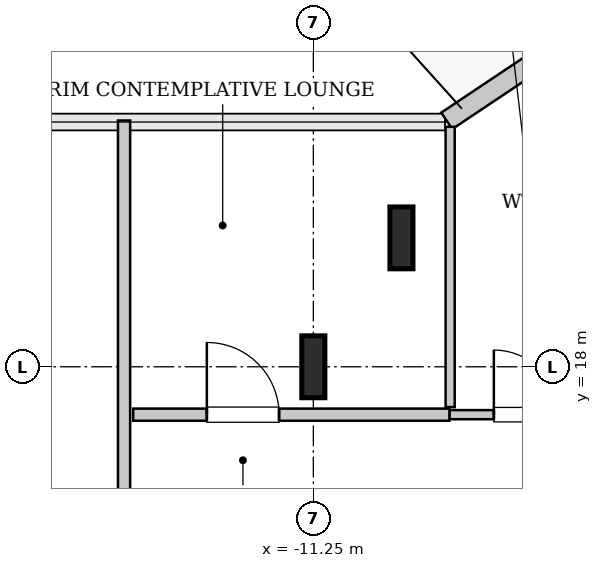
"""IFC4 building model, lengths in metres.
Left out: names, types, materials, properties, quantities, classifications, styles, units other than length and angle.
Written with IfcOpenShell. Run it as: python <this file> out.ifc"""

import sys

from ifc_helpers import new_model, si_unit, direction, frame, frame_2d, origin, origin_2d, place, context, subcontext, project, spatial, rectangle, i_section, extrude, source, transform, mapped, element, fill, save


model = new_model("IFC4")
c1 = context("Model", 3, precision=1e-05, world=origin(), true_north=direction((0.0, 1.0)))
c2 = subcontext(c1, "Body", "Model", "MODEL_VIEW")
j1 = project(units=[si_unit("LENGTHUNIT", "METRE"), si_unit("PLANEANGLEUNIT", "RADIAN")], contexts=[c1])
p1 = place(None, origin())
s1 = spatial("IfcSite", under=j1, at=p1, CompositionType="ELEMENT")
p2 = place(p1, origin())
s2 = spatial("IfcBuilding", under=s1, at=p2, CompositionType="ELEMENT")
p3 = place(p2, frame((0.0, 0.0, 171.6)))
s3 = spatial("IfcBuildingStorey", under=s2, at=p3, CompositionType="ELEMENT", Elevation=171.6)
m1 = source(origin(), c2, "Body", "SweptSolid", [
    extrude(i_section(OverallWidth=0.303, OverallDepth=0.814, WebThickness=0.021, FlangeThickness=0.04, FilletRadius=0.03, at=origin_2d()), origin(), (0.0, 0.0, 1.0), 3.8),
])
for number, where, z_axis, x_axis in (
    (1, (-11.25, 18.0, 0.0), (0.0, 0.0, 1.0), (1.0, 0.0, 0.0)),
    (2, (-10.091, 19.696, 0.0), (0.0, 0.0, 1.0), (1.0, 0.0, 0.0)),
):
    element("IfcColumn", number, at=place(p3, frame(where, z_axis=z_axis, x_axis=x_axis)), inside=s3, PredefinedType="COLUMN", context=c2, shape_type="MappedRepresentation", body=[
        mapped(m1, transform((0.0, 0.0, 0.0), x_axis=(1.0, 0.0, 0.0), y_axis=(0.0, 1.0, 0.0), z_axis=(0.0, 0.0, 1.0), scale=1.0)),
    ])
m2 = source(origin(), c2, "Body", "SweptSolid", [
    extrude(rectangle(XDim=1.469, YDim=0.26, at=frame_2d((0.734, 0.0))), origin(), (0.0, 0.0, 1.0), 3.55),
])
p4 = place(p3, frame((-8.273, 22.052, 0.0), z_axis=(0.0, 0.0, 1.0), x_axis=(-0.831461760506, -0.555581983884, 0.0)))
e3 = element("IfcWall", 3, at=p4, inside=s3, PredefinedType="SOLIDWALL", context=c2, shape_type="MappedRepresentation", body=[
    mapped(m2, transform((0.0, 0.0, 0.0), x_axis=(1.0, 0.0, 0.0), y_axis=(0.0, 1.0, 0.0), z_axis=(0.0, 0.0, 1.0), scale=1.0)),
])
m3 = source(origin(), c2, "Body", "SweptSolid", [
    extrude(rectangle(XDim=2.02, YDim=0.12, at=frame_2d((1.01, 0.0))), origin(), (0.0, 0.0, 1.0), 3.535),
])
p5 = place(p3, frame((-9.46, 17.37, 0.0), z_axis=(0.0, 0.0, 1.0), x_axis=(1.0, 0.0, 0.0)))
e4 = element("IfcWall", 4, at=p5, inside=s3, PredefinedType="PLUMBINGWALL", context=c2, shape_type="MappedRepresentation", body=[
    mapped(m3, transform((0.0, 0.0, 0.0), x_axis=(1.0, 0.0, 0.0), y_axis=(0.0, 1.0, 0.0), z_axis=(0.0, 0.0, 1.0), scale=1.0)),
])
p6 = place(p5, frame((0.585, 0.0, 0.0)))
e5 = element("IfcOpeningElement", 5, at=p6, cuts=e4, PredefinedType="OPENING", context=c2, shape_type="SweptSolid", body=[
    extrude(rectangle(XDim=0.85, YDim=2.1, at=frame_2d((0.425, 1.05))), frame((0.0, 0.07, 0.0), z_axis=(0.0, -1.0, 0.0), x_axis=(1.0, 0.0, 0.0)), (0.0, 0.0, 1.0), 0.14),
])
m4 = source(origin(), c2, "Body", "SweptSolid", [
    extrude(rectangle(XDim=3.687, YDim=0.12, at=frame_2d((1.843, 0.0))), origin(), (0.0, 0.0, 1.0), 3.535),
])
p7 = place(p3, frame((-9.45, 17.47, 0.0), z_axis=(0.0, 0.0, 1.0), x_axis=(0.0, 1.0, 0.0)))
e6 = element("IfcWall", 6, at=p7, inside=s3, PredefinedType="PLUMBINGWALL", context=c2, shape_type="MappedRepresentation", body=[
    mapped(m4, transform((0.0, 0.0, 0.0), x_axis=(1.0, 0.0, 0.0), y_axis=(0.0, 1.0, 0.0), z_axis=(0.0, 0.0, 1.0), scale=1.0)),
])
m5 = source(origin(), c2, "Body", "SweptSolid", [
    extrude(rectangle(XDim=12.752, YDim=0.16, at=frame_2d((6.376, 0.0))), origin(), (0.0, 0.0, 1.0), 3.535),
])
p8 = place(p3, frame((-13.74, 8.488, 0.0), z_axis=(0.0, 0.0, 1.0), x_axis=(0.0, 1.0, 0.0)))
e7 = element("IfcWall", 7, at=p8, inside=s3, PredefinedType="PARTITIONING", context=c2, shape_type="MappedRepresentation", body=[
    mapped(m5, transform((0.0, 0.0, 0.0), x_axis=(1.0, 0.0, 0.0), y_axis=(0.0, 1.0, 0.0), z_axis=(0.0, 0.0, 1.0), scale=1.0)),
])
p9 = place(p8, frame((3.986, 0.0, 0.0)))
e8 = element("IfcOpeningElement", 8, at=p9, cuts=e7, PredefinedType="OPENING", context=c2, shape_type="SweptSolid", body=[
    extrude(rectangle(XDim=0.95, YDim=2.1, at=frame_2d((0.475, 1.05))), frame((0.0, 0.09, 0.0), z_axis=(0.0, -1.0, 0.0), x_axis=(1.0, 0.0, 0.0)), (0.0, 0.0, 1.0), 0.18),
])
m6 = source(origin(), c2, "Body", "SweptSolid", [
    extrude(rectangle(XDim=4.16, YDim=0.16, at=frame_2d((2.08, 0.0))), origin(), (0.0, 0.0, 1.0), 3.535),
])
p10 = place(p3, frame((-13.62, 17.37, 0.0), z_axis=(0.0, 0.0, 1.0), x_axis=(1.0, 0.0, 0.0)))
e9 = element("IfcWall", 9, at=p10, inside=s3, PredefinedType="PARTITIONING", context=c2, shape_type="MappedRepresentation", body=[
    mapped(m6, transform((0.0, 0.0, 0.0), x_axis=(1.0, 0.0, 0.0), y_axis=(0.0, 1.0, 0.0), z_axis=(0.0, 0.0, 1.0), scale=1.0)),
])
p11 = place(p10, frame((0.969, 0.0, 0.0)))
e10 = element("IfcOpeningElement", 10, at=p11, cuts=e9, PredefinedType="OPENING", context=c2, shape_type="SweptSolid", body=[
    extrude(rectangle(XDim=0.95, YDim=2.1, at=frame_2d((0.475, 1.05))), frame((0.0, 0.09, 0.0), z_axis=(0.0, -1.0, 0.0), x_axis=(1.0, 0.0, 0.0)), (0.0, 0.0, 1.0), 0.18),
])
m7 = source(origin(), c2, "Body", "SweptSolid", [
    extrude(rectangle(XDim=0.85, YDim=2.1, at=frame_2d((0.425, 1.05))), frame((0.0, 0.025, 0.0), z_axis=(0.0, -1.0, 0.0), x_axis=(1.0, 0.0, 0.0)), (0.0, 0.0, 1.0), 0.05),
])
p12 = place(p6, origin())
e11 = element("IfcDoor", 11, at=p12, inside=s3, OperationType="SINGLE_SWING_LEFT", PredefinedType="DOOR", context=c2, shape_type="MappedRepresentation", body=[
    mapped(m7, transform((0.0, 0.0, 0.0), x_axis=(1.0, 0.0, 0.0), y_axis=(0.0, 1.0, 0.0), z_axis=(0.0, 0.0, 1.0), scale=1.0)),
])
fill(e5, e11)
m8 = source(origin(), c2, "Body", "SweptSolid", [
    extrude(rectangle(XDim=0.95, YDim=2.1, at=frame_2d((0.475, 1.05))), frame((0.0, 0.025, 0.0), z_axis=(0.0, -1.0, 0.0), x_axis=(1.0, 0.0, 0.0)), (0.0, 0.0, 1.0), 0.05),
])
p13 = place(p11, origin())
e12 = element("IfcDoor", 12, at=p13, inside=s3, OperationType="SINGLE_SWING_LEFT", PredefinedType="DOOR", context=c2, shape_type="MappedRepresentation", body=[
    mapped(m8, transform((0.0, 0.0, 0.0), x_axis=(1.0, 0.0, 0.0), y_axis=(0.0, 1.0, 0.0), z_axis=(0.0, 0.0, 1.0), scale=1.0)),
])
fill(e10, e12)
save(model, sys.argv[1])
